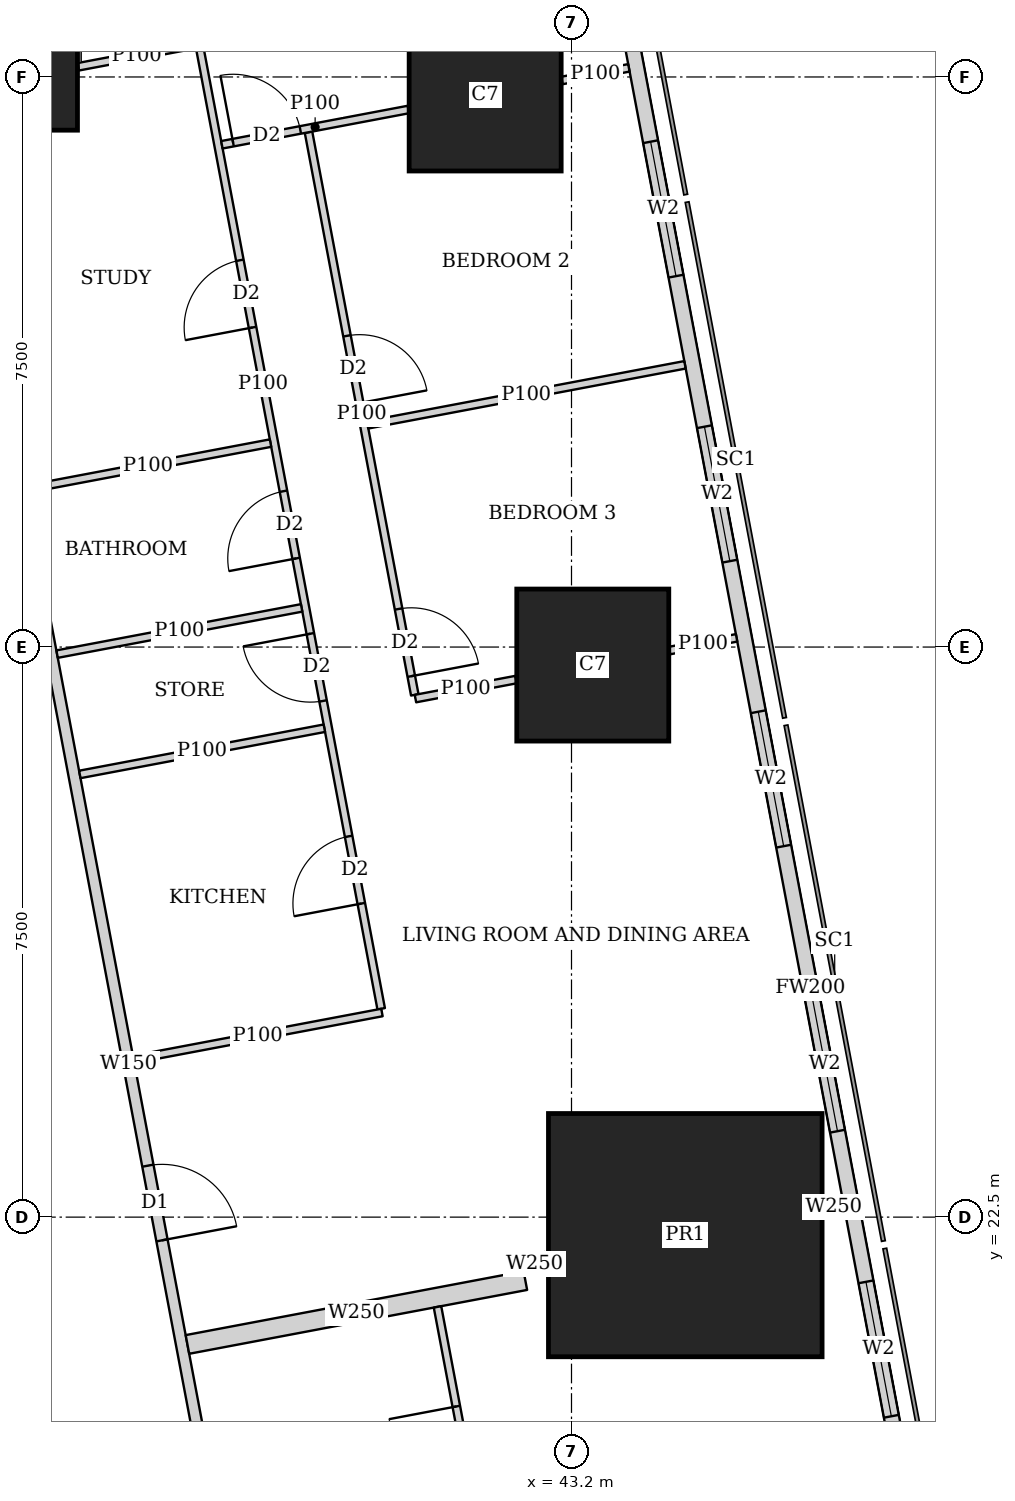
"""IFC4 building model, lengths in metres.
Left out: names, types, materials, properties, quantities, classifications, styles, units other than length and angle.
Written with IfcOpenShell. Run it as: python <this file> out.ifc"""

import sys

from ifc_helpers import new_model, si_unit, direction, frame, frame_2d, origin, origin_2d, place, context, subcontext, project, spatial, rectangle, extrude, element, fill, save


model = new_model("IFC4")
c1 = context("Model", 3, precision=1e-05, world=origin(), true_north=direction((0.0, 1.0)))
c2 = subcontext(c1, "Body", "Model", "MODEL_VIEW")
j1 = project(units=[si_unit("LENGTHUNIT", "METRE"), si_unit("PLANEANGLEUNIT", "RADIAN")], contexts=[c1])
p1 = place(None, origin())
s1 = spatial("IfcSite", under=j1, at=p1, CompositionType="ELEMENT")
p2 = place(p1, origin())
s2 = spatial("IfcBuilding", under=s1, at=p2, CompositionType="ELEMENT")
p3 = place(p2, frame((0.0, 0.0, 292.85)))
s3 = spatial("IfcBuildingStorey", under=s2, at=p3, CompositionType="ELEMENT", Elevation=292.85)
p4 = place(p3, frame((44.697, 22.263, 0.0), z_axis=(0.0, 0.0, 1.0), x_axis=(1.0, 0.0, 0.0)))
e1 = element("IfcColumn", 1, at=p4, inside=s3, PredefinedType="COLUMN", context=c2, shape_type="SweptSolid", body=[
    extrude(rectangle(XDim=3.6, YDim=3.2, at=origin_2d()), origin(), (0.0, 0.0, 1.0), 3.75),
])
p5 = place(p3, frame((43.48, 29.763, 0.0), z_axis=(0.0, 0.0, 1.0), x_axis=(1.0, 0.0, 0.0)))
e2 = element("IfcColumn", 2, at=p5, inside=s3, PredefinedType="COLUMN", context=c2, shape_type="SweptSolid", body=[
    extrude(rectangle(XDim=2.0, YDim=2.0, at=origin_2d()), origin(), (0.0, 0.0, 1.0), 3.75),
])
p6 = place(p3, frame((36.0, 37.5, 0.0), z_axis=(0.0, 0.0, 1.0), x_axis=(1.0, 0.0, 0.0)))
e3 = element("IfcColumn", 3, at=p6, inside=s3, PredefinedType="COLUMN", context=c2, shape_type="SweptSolid", body=[
    extrude(rectangle(XDim=1.4, YDim=1.4, at=origin_2d()), origin(), (0.0, 0.0, 1.0), 3.75),
])
p7 = place(p3, frame((42.064, 37.263, 0.0), z_axis=(0.0, 0.0, 1.0), x_axis=(1.0, 0.0, 0.0)))
e4 = element("IfcColumn", 4, at=p7, inside=s3, PredefinedType="COLUMN", context=c2, shape_type="SweptSolid", body=[
    extrude(rectangle(XDim=2.0, YDim=2.0, at=origin_2d()), origin(), (0.0, 0.0, 1.0), 3.75),
])
p8 = place(p3, frame((49.684, 7.832, 0.0), z_axis=(0.0, 0.0, 1.0), x_axis=(-0.185616669694, 0.982622232565, 0.0)))
e5 = element("IfcWall", 5, at=p8, inside=s3, PredefinedType="SOLIDWALL", context=c2, shape_type="SweptSolid", body=[
    extrude(rectangle(XDim=36.0, YDim=0.2, at=frame_2d((18.0, 0.0))), origin(), (0.0, 0.0, 1.0), 3.4),
])
p9 = place(p8, frame((2.518, 0.0, 0.9)))
e6 = element("IfcOpeningElement", 6, at=p9, cuts=e5, PredefinedType="OPENING", context=c2, shape_type="SweptSolid", body=[
    extrude(rectangle(XDim=2.4, YDim=1.5, at=frame_2d((1.2, 0.75))), frame((0.0, 0.11, 0.0), z_axis=(0.0, -1.0, 0.0), x_axis=(1.0, 0.0, 0.0)), (0.0, 0.0, 1.0), 0.22),
])
p10 = place(p8, frame((8.444, 0.0, 0.9)))
e7 = element("IfcOpeningElement", 7, at=p10, cuts=e5, PredefinedType="OPENING", context=c2, shape_type="SweptSolid", body=[
    extrude(rectangle(XDim=1.8, YDim=1.5, at=frame_2d((0.9, 0.75))), frame((0.0, 0.11, 0.0), z_axis=(0.0, -1.0, 0.0), x_axis=(1.0, 0.0, 0.0)), (0.0, 0.0, 1.0), 0.22),
])
p11 = place(p8, frame((12.261, 0.0, 0.9)))
e8 = element("IfcOpeningElement", 8, at=p11, cuts=e5, PredefinedType="OPENING", context=c2, shape_type="SweptSolid", body=[
    extrude(rectangle(XDim=1.8, YDim=1.5, at=frame_2d((0.9, 0.75))), frame((0.0, 0.11, 0.0), z_axis=(0.0, -1.0, 0.0), x_axis=(1.0, 0.0, 0.0)), (0.0, 0.0, 1.0), 0.22),
])
p12 = place(p8, frame((16.078, 0.0, 0.9)))
e9 = element("IfcOpeningElement", 9, at=p12, cuts=e5, PredefinedType="OPENING", context=c2, shape_type="SweptSolid", body=[
    extrude(rectangle(XDim=1.8, YDim=1.5, at=frame_2d((0.9, 0.75))), frame((0.0, 0.11, 0.0), z_axis=(0.0, -1.0, 0.0), x_axis=(1.0, 0.0, 0.0)), (0.0, 0.0, 1.0), 0.22),
])
p13 = place(p8, frame((19.894, 0.0, 0.9)))
e10 = element("IfcOpeningElement", 10, at=p13, cuts=e5, PredefinedType="OPENING", context=c2, shape_type="SweptSolid", body=[
    extrude(rectangle(XDim=1.8, YDim=1.5, at=frame_2d((0.9, 0.75))), frame((0.0, 0.11, 0.0), z_axis=(0.0, -1.0, 0.0), x_axis=(1.0, 0.0, 0.0)), (0.0, 0.0, 1.0), 0.22),
])
p14 = place(p8, frame((23.71, 0.0, 0.9)))
e11 = element("IfcOpeningElement", 11, at=p14, cuts=e5, PredefinedType="OPENING", context=c2, shape_type="SweptSolid", body=[
    extrude(rectangle(XDim=1.8, YDim=1.5, at=frame_2d((0.9, 0.75))), frame((0.0, 0.11, 0.0), z_axis=(0.0, -1.0, 0.0), x_axis=(1.0, 0.0, 0.0)), (0.0, 0.0, 1.0), 0.22),
])
p15 = place(p8, frame((27.526, 0.0, 0.9)))
e12 = element("IfcOpeningElement", 12, at=p15, cuts=e5, PredefinedType="OPENING", context=c2, shape_type="SweptSolid", body=[
    extrude(rectangle(XDim=1.8, YDim=1.5, at=frame_2d((0.9, 0.75))), frame((0.0, 0.11, 0.0), z_axis=(0.0, -1.0, 0.0), x_axis=(1.0, 0.0, 0.0)), (0.0, 0.0, 1.0), 0.22),
])
p16 = place(p8, frame((32.046, 0.0, 0.9)))
e13 = element("IfcOpeningElement", 13, at=p16, cuts=e5, PredefinedType="OPENING", context=c2, shape_type="SweptSolid", body=[
    extrude(rectangle(XDim=1.8, YDim=1.5, at=frame_2d((0.9, 0.75))), frame((0.0, 0.11, 0.0), z_axis=(0.0, -1.0, 0.0), x_axis=(1.0, 0.0, 0.0)), (0.0, 0.0, 1.0), 0.22),
])
p17 = place(p3, frame((34.036, 42.186, 0.0), z_axis=(0.0, 0.0, 1.0), x_axis=(0.185593518645, -0.9826266055, 0.0)))
e14 = element("IfcWall", 14, at=p17, inside=s3, PredefinedType="SOLIDWALL", context=c2, shape_type="SweptSolid", body=[
    extrude(rectangle(XDim=35.961, YDim=0.15, at=frame_2d((17.98, 0.0))), origin(), (0.0, 0.0, 1.0), 2.4),
])
p18 = place(p17, frame((19.345, 0.0, 0.0)))
e15 = element("IfcOpeningElement", 15, at=p18, cuts=e14, PredefinedType="OPENING", context=c2, shape_type="SweptSolid", body=[
    extrude(rectangle(XDim=1.0, YDim=2.1, at=frame_2d((0.5, 1.05))), frame((0.0, 0.085, 0.0), z_axis=(0.0, -1.0, 0.0), x_axis=(1.0, 0.0, 0.0)), (0.0, 0.0, 1.0), 0.17),
])
p19 = place(p17, frame((33.774, 0.0, 0.0)))
e16 = element("IfcOpeningElement", 16, at=p19, cuts=e14, PredefinedType="OPENING", context=c2, shape_type="SweptSolid", body=[
    extrude(rectangle(XDim=1.0, YDim=2.1, at=frame_2d((0.5, 1.05))), frame((0.0, 0.085, 0.0), z_axis=(0.0, -1.0, 0.0), x_axis=(1.0, 0.0, 0.0)), (0.0, 0.0, 1.0), 0.17),
])
p20 = place(p3, frame((43.955, 37.62, 0.0), z_axis=(0.0, 0.0, 1.0), x_axis=(-0.982708424405, -0.18515980288, 0.0)))
e17 = element("IfcWall", 17, at=p20, inside=s3, PredefinedType="PARTITIONING", context=c2, shape_type="SweptSolid", body=[
    extrude(rectangle(XDim=0.897, YDim=0.1, at=frame_2d((0.448, 0.0))), origin(), (0.0, 0.0, 1.0), 3.4),
])
p21 = place(p3, frame((41.054, 37.072, 0.0), z_axis=(0.0, 0.0, 1.0), x_axis=(-0.982579896219, -0.185840650951, 0.0)))
e18 = element("IfcWall", 18, at=p21, inside=s3, PredefinedType="PARTITIONING", context=c2, shape_type="SweptSolid", body=[
    extrude(rectangle(XDim=2.497, YDim=0.1, at=frame_2d((1.249, 0.0))), origin(), (0.0, 0.0, 1.0), 3.4),
])
p22 = place(p21, frame((1.447, 0.0, 0.0)))
e19 = element("IfcOpeningElement", 19, at=p22, cuts=e18, PredefinedType="OPENING", context=c2, shape_type="SweptSolid", body=[
    extrude(rectangle(XDim=0.9, YDim=2.1, at=frame_2d((0.45, 1.05))), frame((0.0, 0.06, 0.0), z_axis=(0.0, -1.0, 0.0), x_axis=(1.0, 0.0, 0.0)), (0.0, 0.0, 1.0), 0.12),
])
p23 = place(p3, frame((44.693, 33.713, 0.0), z_axis=(0.0, 0.0, 1.0), x_axis=(-0.982623519589, -0.185609856287, 0.0)))
e20 = element("IfcWall", 20, at=p23, inside=s3, PredefinedType="PARTITIONING", context=c2, shape_type="SweptSolid", body=[
    extrude(rectangle(XDim=4.25, YDim=0.1, at=frame_2d((2.125, 0.0))), origin(), (0.0, 0.0, 1.0), 2.4),
])
p24 = place(p3, frame((45.372, 30.121, 0.0), z_axis=(0.0, 0.0, 1.0), x_axis=(-0.982547416156, -0.186012297994, 0.0)))
e21 = element("IfcWall", 21, at=p24, inside=s3, PredefinedType="PARTITIONING", context=c2, shape_type="SweptSolid", body=[
    extrude(rectangle(XDim=0.898, YDim=0.1, at=frame_2d((0.449, 0.0))), origin(), (0.0, 0.0, 1.0), 3.4),
])
p25 = place(p3, frame((42.47, 29.572, 0.0), z_axis=(0.0, 0.0, 1.0), x_axis=(-0.982610503289, -0.185678751683, 0.0)))
e22 = element("IfcWall", 22, at=p25, inside=s3, PredefinedType="PARTITIONING", context=c2, shape_type="SweptSolid", body=[
    extrude(rectangle(XDim=1.346, YDim=0.1, at=frame_2d((0.673, 0.0))), origin(), (0.0, 0.0, 1.0), 2.4),
])
p26 = place(p3, frame((38.25, 37.925, 0.0), z_axis=(0.0, 0.0, 1.0), x_axis=(-0.982610209589, -0.185680305934, 0.0)))
e23 = element("IfcWall", 23, at=p26, inside=s3, PredefinedType="PARTITIONING", context=c2, shape_type="SweptSolid", body=[
    extrude(rectangle(XDim=1.567, YDim=0.1, at=frame_2d((0.784, 0.0))), origin(), (0.0, 0.0, 1.0), 3.4),
])
p27 = place(p3, frame((39.24, 32.683, 0.0), z_axis=(0.0, 0.0, 1.0), x_axis=(-0.982607026909, -0.185697147715, 0.0)))
e24 = element("IfcWall", 24, at=p27, inside=s3, PredefinedType="PARTITIONING", context=c2, shape_type="SweptSolid", body=[
    extrude(rectangle(XDim=3.275, YDim=0.1, at=frame_2d((1.637, 0.0))), origin(), (0.0, 0.0, 1.0), 3.4),
])
p28 = place(p3, frame((39.948, 28.932, 0.0), z_axis=(0.0, 0.0, 1.0), x_axis=(-0.982610347627, -0.185679575441, 0.0)))
e25 = element("IfcWall", 25, at=p28, inside=s3, PredefinedType="PARTITIONING", context=c2, shape_type="SweptSolid", body=[
    extrude(rectangle(XDim=3.274, YDim=0.1, at=frame_2d((1.637, 0.0))), origin(), (0.0, 0.0, 1.0), 3.4),
])
p29 = place(p3, frame((40.706, 25.192, 0.0), z_axis=(0.0, 0.0, 1.0), x_axis=(-0.982633623707, -0.185556356831, 0.0)))
e26 = element("IfcWall", 26, at=p29, inside=s3, PredefinedType="PARTITIONING", context=c2, shape_type="SweptSolid", body=[
    extrude(rectangle(XDim=3.325, YDim=0.1, at=frame_2d((1.663, 0.0))), origin(), (0.0, 0.0, 1.0), 3.4),
])
p30 = place(p3, frame((39.649, 30.515, 0.0), z_axis=(0.0, 0.0, 1.0), x_axis=(-0.982610347627, -0.185679575441, 0.0)))
e27 = element("IfcWall", 27, at=p30, inside=s3, PredefinedType="PARTITIONING", context=c2, shape_type="SweptSolid", body=[
    extrude(rectangle(XDim=3.274, YDim=0.1, at=frame_2d((1.637, 0.0))), origin(), (0.0, 0.0, 1.0), 2.4),
])
p31 = place(p3, frame((37.591, 41.685, 0.0), z_axis=(0.0, 0.0, 1.0), x_axis=(0.185541820726, -0.982636368532, 0.0)))
e28 = element("IfcWall", 28, at=p31, inside=s3, PredefinedType="PARTITIONING", context=c2, shape_type="SweptSolid", body=[
    extrude(rectangle(XDim=16.735, YDim=0.1, at=frame_2d((8.367, 0.0))), origin(), (0.0, 0.0, 1.0), 2.4),
])
p32 = place(p31, frame((2.413, 0.0, 0.0)))
e29 = element("IfcOpeningElement", 29, at=p32, cuts=e28, PredefinedType="OPENING", context=c2, shape_type="SweptSolid", body=[
    extrude(rectangle(XDim=0.9, YDim=2.1, at=frame_2d((0.45, 1.05))), frame((0.0, 0.06, 0.0), z_axis=(0.0, -1.0, 0.0), x_axis=(1.0, 0.0, 0.0)), (0.0, 0.0, 1.0), 0.12),
])
p33 = place(p31, frame((6.713, 0.0, 0.0)))
e30 = element("IfcOpeningElement", 30, at=p33, cuts=e28, PredefinedType="OPENING", context=c2, shape_type="SweptSolid", body=[
    extrude(rectangle(XDim=0.9, YDim=2.1, at=frame_2d((0.45, 1.05))), frame((0.0, 0.06, 0.0), z_axis=(0.0, -1.0, 0.0), x_axis=(1.0, 0.0, 0.0)), (0.0, 0.0, 1.0), 0.12),
])
p34 = place(p31, frame((9.805, 0.0, 0.0)))
e31 = element("IfcOpeningElement", 31, at=p34, cuts=e28, PredefinedType="OPENING", context=c2, shape_type="SweptSolid", body=[
    extrude(rectangle(XDim=0.9, YDim=2.1, at=frame_2d((0.45, 1.05))), frame((0.0, 0.06, 0.0), z_axis=(0.0, -1.0, 0.0), x_axis=(1.0, 0.0, 0.0)), (0.0, 0.0, 1.0), 0.12),
])
p35 = place(p31, frame((11.713, 0.0, 0.0)))
e32 = element("IfcOpeningElement", 32, at=p35, cuts=e28, PredefinedType="OPENING", context=c2, shape_type="SweptSolid", body=[
    extrude(rectangle(XDim=0.9, YDim=2.1, at=frame_2d((0.45, 1.05))), frame((0.0, 0.06, 0.0), z_axis=(0.0, -1.0, 0.0), x_axis=(1.0, 0.0, 0.0)), (0.0, 0.0, 1.0), 0.12),
])
p36 = place(p31, frame((14.426, 0.0, 0.0)))
e33 = element("IfcOpeningElement", 33, at=p36, cuts=e28, PredefinedType="OPENING", context=c2, shape_type="SweptSolid", body=[
    extrude(rectangle(XDim=0.9, YDim=2.1, at=frame_2d((0.45, 1.05))), frame((0.0, 0.06, 0.0), z_axis=(0.0, -1.0, 0.0), x_axis=(1.0, 0.0, 0.0)), (0.0, 0.0, 1.0), 0.12),
])
p37 = place(p3, frame((39.74, 36.773, 0.0), z_axis=(0.0, 0.0, 1.0), x_axis=(0.185583825641, -0.982628436216, 0.0)))
e34 = element("IfcWall", 34, at=p37, inside=s3, PredefinedType="PARTITIONING", context=c2, shape_type="SweptSolid", body=[
    extrude(rectangle(XDim=7.533, YDim=0.1, at=frame_2d((3.766, 0.0))), origin(), (0.0, 0.0, 1.0), 2.4),
])
p38 = place(p37, frame((2.726, 0.0, 0.0)))
e35 = element("IfcOpeningElement", 35, at=p38, cuts=e34, PredefinedType="OPENING", context=c2, shape_type="SweptSolid", body=[
    extrude(rectangle(XDim=0.9, YDim=2.1, at=frame_2d((0.45, 1.05))), frame((0.0, 0.06, 0.0), z_axis=(0.0, -1.0, 0.0), x_axis=(1.0, 0.0, 0.0)), (0.0, 0.0, 1.0), 0.12),
])
p39 = place(p37, frame((6.383, 0.0, 0.0)))
e36 = element("IfcOpeningElement", 36, at=p39, cuts=e34, PredefinedType="OPENING", context=c2, shape_type="SweptSolid", body=[
    extrude(rectangle(XDim=0.9, YDim=2.1, at=frame_2d((0.45, 1.05))), frame((0.0, 0.06, 0.0), z_axis=(0.0, -1.0, 0.0), x_axis=(1.0, 0.0, 0.0)), (0.0, 0.0, 1.0), 0.12),
])
p40 = place(p3, frame((46.782, 22.657, 0.0), z_axis=(0.0, 0.0, 1.0), x_axis=(-0.982104607121, -0.188336243648, 0.0)))
e37 = element("IfcWall", 37, at=p40, inside=s3, PredefinedType="SOLIDWALL", context=c2, shape_type="SweptSolid", body=[
    extrude(rectangle(XDim=0.266, YDim=0.25, at=frame_2d((0.133, 0.0))), origin(), (0.0, 0.0, 1.0), 3.4),
])
p41 = place(p3, frame((42.873, 21.918, 0.0), z_axis=(0.0, 0.0, 1.0), x_axis=(-0.982431406936, -0.186624035603, 0.0)))
e38 = element("IfcWall", 38, at=p41, inside=s3, PredefinedType="SOLIDWALL", context=c2, shape_type="SweptSolid", body=[
    extrude(rectangle(XDim=0.322, YDim=0.25, at=frame_2d((0.161, 0.0))), origin(), (0.0, 0.0, 1.0), 2.4),
])
p42 = place(p3, frame((42.593, 21.665, 0.0), z_axis=(0.0, 0.0, 1.0), x_axis=(-0.982612837616, -0.185666398014, 0.0)))
e39 = element("IfcWall", 39, at=p42, inside=s3, PredefinedType="SOLIDWALL", context=c2, shape_type="SweptSolid", body=[
    extrude(rectangle(XDim=4.525, YDim=0.25, at=frame_2d((2.262, 0.0))), origin(), (0.0, 0.0, 1.0), 2.4),
])
p43 = place(p3, frame((41.437, 21.319, 0.0), z_axis=(0.0, 0.0, 1.0), x_axis=(0.185742368638, -0.982598479794, 0.0)))
e40 = element("IfcWall", 40, at=p43, inside=s3, PredefinedType="PARTITIONING", context=c2, shape_type="SweptSolid", body=[
    extrude(rectangle(XDim=5.718, YDim=0.1, at=frame_2d((2.859, 0.0))), origin(), (0.0, 0.0, 1.0), 3.4),
])
p44 = place(p43, frame((1.333, 0.0, 0.0)))
e41 = element("IfcOpeningElement", 41, at=p44, cuts=e40, PredefinedType="OPENING", context=c2, shape_type="SweptSolid", body=[
    extrude(rectangle(XDim=0.9, YDim=2.1, at=frame_2d((0.45, 1.05))), frame((0.0, 0.06, 0.0), z_axis=(0.0, -1.0, 0.0), x_axis=(1.0, 0.0, 0.0)), (0.0, 0.0, 1.0), 0.12),
])
p45 = place(p43, frame((4.664, 0.0, 0.0)))
e42 = element("IfcOpeningElement", 42, at=p45, cuts=e40, PredefinedType="OPENING", context=c2, shape_type="SweptSolid", body=[
    extrude(rectangle(XDim=0.9, YDim=2.1, at=frame_2d((0.45, 1.05))), frame((0.0, 0.06, 0.0), z_axis=(0.0, -1.0, 0.0), x_axis=(1.0, 0.0, 0.0)), (0.0, 0.0, 1.0), 0.12),
])
p46 = place(p11, origin())
e43 = element("IfcWindow", 43, at=p46, inside=s3, PartitioningType="SINGLE_PANEL", PredefinedType="WINDOW", context=c2, shape_type="SweptSolid", body=[
    extrude(rectangle(XDim=1.8, YDim=1.5, at=frame_2d((0.9, 0.75))), frame((0.0, 0.03, 0.0), z_axis=(0.0, -1.0, 0.0), x_axis=(1.0, 0.0, 0.0)), (0.0, 0.0, 1.0), 0.06),
])
fill(e8, e43)
p47 = place(p12, origin())
e44 = element("IfcWindow", 44, at=p47, inside=s3, PartitioningType="SINGLE_PANEL", PredefinedType="WINDOW", context=c2, shape_type="SweptSolid", body=[
    extrude(rectangle(XDim=1.8, YDim=1.5, at=frame_2d((0.9, 0.75))), frame((0.0, 0.03, 0.0), z_axis=(0.0, -1.0, 0.0), x_axis=(1.0, 0.0, 0.0)), (0.0, 0.0, 1.0), 0.06),
])
fill(e9, e44)
p48 = place(p13, origin())
e45 = element("IfcWindow", 45, at=p48, inside=s3, PartitioningType="SINGLE_PANEL", PredefinedType="WINDOW", context=c2, shape_type="SweptSolid", body=[
    extrude(rectangle(XDim=1.8, YDim=1.5, at=frame_2d((0.9, 0.75))), frame((0.0, 0.03, 0.0), z_axis=(0.0, -1.0, 0.0), x_axis=(1.0, 0.0, 0.0)), (0.0, 0.0, 1.0), 0.06),
])
fill(e10, e45)
p49 = place(p14, origin())
e46 = element("IfcWindow", 46, at=p49, inside=s3, PartitioningType="SINGLE_PANEL", PredefinedType="WINDOW", context=c2, shape_type="SweptSolid", body=[
    extrude(rectangle(XDim=1.8, YDim=1.5, at=frame_2d((0.9, 0.75))), frame((0.0, 0.03, 0.0), z_axis=(0.0, -1.0, 0.0), x_axis=(1.0, 0.0, 0.0)), (0.0, 0.0, 1.0), 0.06),
])
fill(e11, e46)
p50 = place(p15, origin())
e47 = element("IfcWindow", 47, at=p50, inside=s3, PartitioningType="SINGLE_PANEL", PredefinedType="WINDOW", context=c2, shape_type="SweptSolid", body=[
    extrude(rectangle(XDim=1.8, YDim=1.5, at=frame_2d((0.9, 0.75))), frame((0.0, 0.03, 0.0), z_axis=(0.0, -1.0, 0.0), x_axis=(1.0, 0.0, 0.0)), (0.0, 0.0, 1.0), 0.06),
])
fill(e12, e47)
p51 = place(p22, origin())
e48 = element("IfcDoor", 48, at=p51, inside=s3, OperationType="SINGLE_SWING_LEFT", PredefinedType="DOOR", context=c2, shape_type="SweptSolid", body=[
    extrude(rectangle(XDim=0.9, YDim=2.1, at=frame_2d((0.45, 1.05))), frame((0.0, 0.025, 0.0), z_axis=(0.0, -1.0, 0.0), x_axis=(1.0, 0.0, 0.0)), (0.0, 0.0, 1.0), 0.05),
])
fill(e19, e48)
p52 = place(p33, origin())
e49 = element("IfcDoor", 49, at=p52, inside=s3, OperationType="SINGLE_SWING_LEFT", PredefinedType="DOOR", context=c2, shape_type="SweptSolid", body=[
    extrude(rectangle(XDim=0.9, YDim=2.1, at=frame_2d((0.45, 1.05))), frame((0.0, 0.025, 0.0), z_axis=(0.0, -1.0, 0.0), x_axis=(1.0, 0.0, 0.0)), (0.0, 0.0, 1.0), 0.05),
])
fill(e30, e49)
p53 = place(p34, origin())
e50 = element("IfcDoor", 50, at=p53, inside=s3, OperationType="SINGLE_SWING_LEFT", PredefinedType="DOOR", context=c2, shape_type="SweptSolid", body=[
    extrude(rectangle(XDim=0.9, YDim=2.1, at=frame_2d((0.45, 1.05))), frame((0.0, 0.025, 0.0), z_axis=(0.0, -1.0, 0.0), x_axis=(1.0, 0.0, 0.0)), (0.0, 0.0, 1.0), 0.05),
])
fill(e31, e50)
p54 = place(p35, origin())
e51 = element("IfcDoor", 51, at=p54, inside=s3, OperationType="SINGLE_SWING_RIGHT", PredefinedType="DOOR", context=c2, shape_type="SweptSolid", body=[
    extrude(rectangle(XDim=0.9, YDim=2.1, at=frame_2d((0.45, 1.05))), frame((0.0, 0.025, 0.0), z_axis=(0.0, -1.0, 0.0), x_axis=(1.0, 0.0, 0.0)), (0.0, 0.0, 1.0), 0.05),
])
fill(e32, e51)
p55 = place(p36, origin())
e52 = element("IfcDoor", 52, at=p55, inside=s3, OperationType="SINGLE_SWING_LEFT", PredefinedType="DOOR", context=c2, shape_type="SweptSolid", body=[
    extrude(rectangle(XDim=0.9, YDim=2.1, at=frame_2d((0.45, 1.05))), frame((0.0, 0.025, 0.0), z_axis=(0.0, -1.0, 0.0), x_axis=(1.0, 0.0, 0.0)), (0.0, 0.0, 1.0), 0.05),
])
fill(e33, e52)
p56 = place(p38, origin())
e53 = element("IfcDoor", 53, at=p56, inside=s3, OperationType="SINGLE_SWING_RIGHT", PredefinedType="DOOR", context=c2, shape_type="SweptSolid", body=[
    extrude(rectangle(XDim=0.9, YDim=2.1, at=frame_2d((0.45, 1.05))), frame((0.0, 0.025, 0.0), z_axis=(0.0, -1.0, 0.0), x_axis=(1.0, 0.0, 0.0)), (0.0, 0.0, 1.0), 0.05),
])
fill(e35, e53)
p57 = place(p39, origin())
e54 = element("IfcDoor", 54, at=p57, inside=s3, OperationType="SINGLE_SWING_RIGHT", PredefinedType="DOOR", context=c2, shape_type="SweptSolid", body=[
    extrude(rectangle(XDim=0.9, YDim=2.1, at=frame_2d((0.45, 1.05))), frame((0.0, 0.025, 0.0), z_axis=(0.0, -1.0, 0.0), x_axis=(1.0, 0.0, 0.0)), (0.0, 0.0, 1.0), 0.05),
])
fill(e36, e54)
p58 = place(p18, origin())
e55 = element("IfcDoor", 55, at=p58, inside=s3, OperationType="SINGLE_SWING_RIGHT", PredefinedType="DOOR", context=c2, shape_type="SweptSolid", body=[
    extrude(rectangle(XDim=1.0, YDim=2.1, at=frame_2d((0.5, 1.05))), frame((0.0, 0.025, 0.0), z_axis=(0.0, -1.0, 0.0), x_axis=(1.0, 0.0, 0.0)), (0.0, 0.0, 1.0), 0.05),
])
fill(e15, e55)
p59 = place(p44, origin())
e56 = element("IfcDoor", 56, at=p59, inside=s3, OperationType="SINGLE_SWING_RIGHT", PredefinedType="DOOR", context=c2, shape_type="SweptSolid", body=[
    extrude(rectangle(XDim=0.9, YDim=2.1, at=frame_2d((0.45, 1.05))), frame((0.0, 0.025, 0.0), z_axis=(0.0, -1.0, 0.0), x_axis=(1.0, 0.0, 0.0)), (0.0, 0.0, 1.0), 0.05),
])
fill(e41, e56)
save(model, sys.argv[1])
